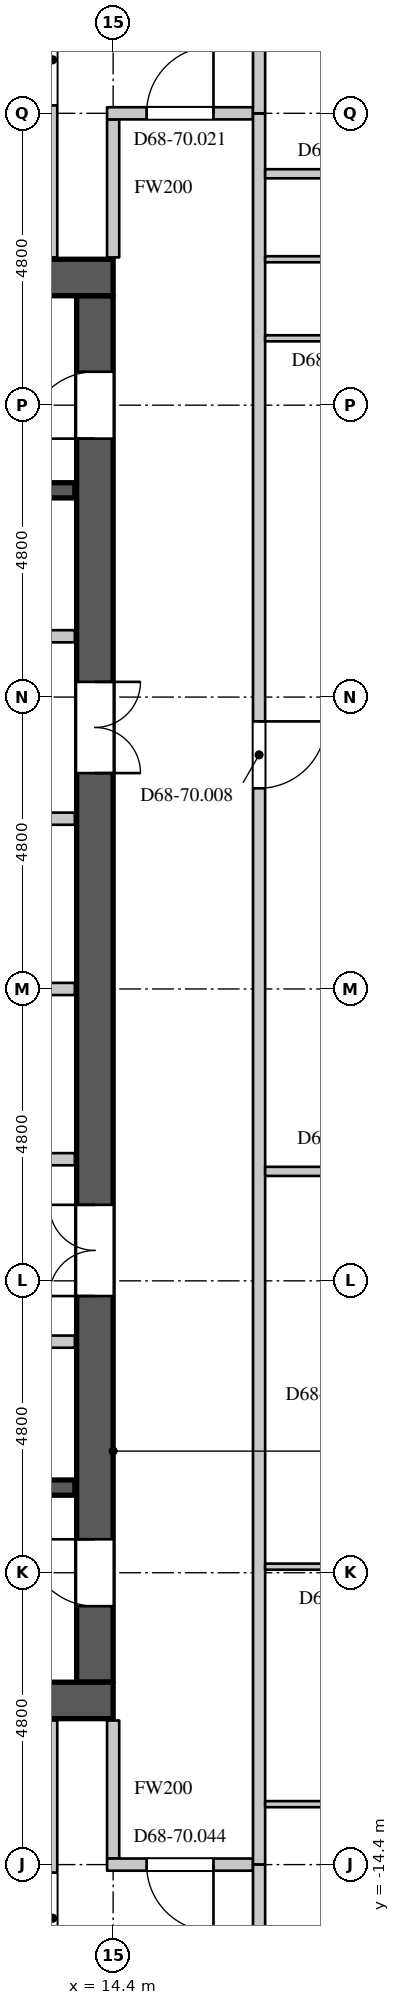
"""IFC4 building model, lengths in metres.
Left out: names, types, materials, properties, quantities, classifications, styles, units other than length and angle.
Written with IfcOpenShell. Run it as: python <this file> out.ifc"""

import sys

from ifc_helpers import new_model, si_unit, direction, frame, frame_2d, origin, place, context, subcontext, project, spatial, rectangle, extrude, element, fill, save


model = new_model("IFC4")
c1 = context("Model", 3, precision=1e-05, world=origin(), true_north=direction((0.0, 1.0)))
c2 = subcontext(c1, "Body", "Model", "MODEL_VIEW")
j1 = project(units=[si_unit("LENGTHUNIT", "METRE"), si_unit("PLANEANGLEUNIT", "RADIAN")], contexts=[c1])
p1 = place(None, origin())
s1 = spatial("IfcSite", under=j1, at=p1, CompositionType="ELEMENT")
p2 = place(p1, origin())
s2 = spatial("IfcBuilding", under=s1, at=p2, CompositionType="ELEMENT")
p3 = place(p2, frame((0.0, 0.0, 293.7)))
s3 = spatial("IfcBuildingStorey", under=s2, at=p3, CompositionType="ELEMENT", Elevation=293.7)
for number, where, z_axis, x_axis in (
    (1, (-14.4, 11.7, 0.0), (0.0, 0.0, 1.0), (1.0, 0.0, 0.0)),
    (2, (-14.4, -11.7, 0.0), (0.0, 0.0, 1.0), (1.0, 0.0, 0.0)),
):
    element("IfcWall", number, at=place(p3, frame(where, z_axis=z_axis, x_axis=x_axis)), inside=s3, PredefinedType="SHEAR", context=c2, shape_type="SweptSolid", body=[
        extrude(rectangle(XDim=28.8, YDim=0.6, at=frame_2d((14.4, 0.0))), origin(), (0.0, 0.0, 1.0), 4.2),
    ])
p4 = place(p3, frame((14.1, -11.4, 0.0), z_axis=(0.0, 0.0, 1.0), x_axis=(0.0, 1.0, 0.0)))
e3 = element("IfcWall", 3, at=p4, inside=s3, PredefinedType="SHEAR", context=c2, shape_type="SweptSolid", body=[
    extrude(rectangle(XDim=22.8, YDim=0.6, at=frame_2d((11.4, 0.0))), origin(), (0.0, 0.0, 1.0), 4.2),
])
p5 = place(p4, frame((20.45, 0.0, 0.0)))
e4 = element("IfcOpeningElement", 4, at=p5, cuts=e3, PredefinedType="OPENING", context=c2, shape_type="SweptSolid", body=[
    extrude(rectangle(XDim=1.1, YDim=2.2, at=frame_2d((0.55, 1.1))), frame((0.0, 0.31, 0.0), z_axis=(0.0, -1.0, 0.0), x_axis=(1.0, 0.0, 0.0)), (0.0, 0.0, 1.0), 0.62),
])
p6 = place(p4, frame((1.25, 0.0, 0.0)))
e5 = element("IfcOpeningElement", 5, at=p6, cuts=e3, PredefinedType="OPENING", context=c2, shape_type="SweptSolid", body=[
    extrude(rectangle(XDim=1.1, YDim=2.2, at=frame_2d((0.55, 1.1))), frame((0.0, 0.31, 0.0), z_axis=(0.0, -1.0, 0.0), x_axis=(1.0, 0.0, 0.0)), (0.0, 0.0, 1.0), 0.62),
])
p7 = place(p4, frame((14.95, 0.0, 0.0)))
e6 = element("IfcOpeningElement", 6, at=p7, cuts=e3, PredefinedType="OPENING", context=c2, shape_type="SweptSolid", body=[
    extrude(rectangle(XDim=1.5, YDim=2.4, at=frame_2d((0.75, 1.2))), frame((0.0, 0.31, 0.0), z_axis=(0.0, -1.0, 0.0), x_axis=(1.0, 0.0, 0.0)), (0.0, 0.0, 1.0), 0.62),
])
p8 = place(p4, frame((6.35, 0.0, 0.0)))
e7 = element("IfcOpeningElement", 7, at=p8, cuts=e3, PredefinedType="OPENING", context=c2, shape_type="SweptSolid", body=[
    extrude(rectangle(XDim=1.5, YDim=2.4, at=frame_2d((0.75, 1.2))), frame((0.0, 0.31, 0.0), z_axis=(0.0, -1.0, 0.0), x_axis=(1.0, 0.0, 0.0)), (0.0, 0.0, 1.0), 0.62),
])
p9 = place(p3, frame((-2.22, -5.8, 0.0), z_axis=(0.0, 0.0, 1.0), x_axis=(1.0, 0.0, 0.0)))
e8 = element("IfcWall", 8, at=p9, inside=s3, PredefinedType="PARTITIONING", context=c2, shape_type="SweptSolid", body=[
    extrude(rectangle(XDim=15.99, YDim=0.2, at=frame_2d((7.995, 0.0))), origin(), (0.0, 0.0, 1.0), 3.95),
])
p10 = place(p9, frame((3.15, 0.0, 0.0)))
e9 = element("IfcOpeningElement", 9, at=p10, cuts=e8, PredefinedType="OPENING", context=c2, shape_type="SweptSolid", body=[
    extrude(rectangle(XDim=0.9, YDim=2.2, at=frame_2d((0.45, 1.1))), frame((0.0, 0.11, 0.0), z_axis=(0.0, -1.0, 0.0), x_axis=(1.0, 0.0, 0.0)), (0.0, 0.0, 1.0), 0.22),
])
p11 = place(p9, frame((8.5, 0.0, 0.0)))
e10 = element("IfcOpeningElement", 10, at=p11, cuts=e8, PredefinedType="OPENING", context=c2, shape_type="SweptSolid", body=[
    extrude(rectangle(XDim=0.9, YDim=2.2, at=frame_2d((0.45, 1.1))), frame((0.0, 0.11, 0.0), z_axis=(0.0, -1.0, 0.0), x_axis=(1.0, 0.0, 0.0)), (0.0, 0.0, 1.0), 0.22),
])
p12 = place(p9, frame((12.85, 0.0, 0.0)))
e11 = element("IfcOpeningElement", 11, at=p12, cuts=e8, PredefinedType="OPENING", context=c2, shape_type="SweptSolid", body=[
    extrude(rectangle(XDim=0.9, YDim=2.2, at=frame_2d((0.45, 1.1))), frame((0.0, 0.11, 0.0), z_axis=(0.0, -1.0, 0.0), x_axis=(1.0, 0.0, 0.0)), (0.0, 0.0, 1.0), 0.22),
])
p13 = place(p3, frame((14.4, -14.3, 0.0), z_axis=(0.0, 0.0, 1.0), x_axis=(0.0, 1.0, 0.0)))
e12 = element("IfcWall", 12, at=p13, inside=s3, PredefinedType="PARTITIONING", context=c2, shape_type="SweptSolid", body=[
    extrude(rectangle(XDim=2.27, YDim=0.2, at=frame_2d((1.135, 0.0))), origin(), (0.0, 0.0, 1.0), 3.95),
])
p14 = place(p3, frame((14.3, -14.4, 0.0), z_axis=(0.0, 0.0, 1.0), x_axis=(1.0, 0.0, 0.0)))
e13 = element("IfcWall", 13, at=p14, inside=s3, PredefinedType="PARTITIONING", context=c2, shape_type="SweptSolid", body=[
    extrude(rectangle(XDim=2.4, YDim=0.2, at=frame_2d((1.2, 0.0))), origin(), (0.0, 0.0, 1.0), 3.95),
])
p15 = place(p14, frame((0.65, 0.0, 0.0)))
e14 = element("IfcOpeningElement", 14, at=p15, cuts=e13, PredefinedType="OPENING", context=c2, shape_type="SweptSolid", body=[
    extrude(rectangle(XDim=1.1, YDim=2.4, at=frame_2d((0.55, 1.2))), frame((0.0, 0.11, 0.0), z_axis=(0.0, -1.0, 0.0), x_axis=(1.0, 0.0, 0.0)), (0.0, 0.0, 1.0), 0.22),
])
p16 = place(p3, frame((14.4, 12.03, 0.0), z_axis=(0.0, 0.0, 1.0), x_axis=(0.0, 1.0, 0.0)))
e15 = element("IfcWall", 15, at=p16, inside=s3, PredefinedType="PARTITIONING", context=c2, shape_type="SweptSolid", body=[
    extrude(rectangle(XDim=2.27, YDim=0.2, at=frame_2d((1.135, 0.0))), origin(), (0.0, 0.0, 1.0), 3.95),
])
p17 = place(p3, frame((14.3, 14.4, 0.0), z_axis=(0.0, 0.0, 1.0), x_axis=(1.0, 0.0, 0.0)))
e16 = element("IfcWall", 16, at=p17, inside=s3, PredefinedType="PARTITIONING", context=c2, shape_type="SweptSolid", body=[
    extrude(rectangle(XDim=2.4, YDim=0.2, at=frame_2d((1.2, 0.0))), origin(), (0.0, 0.0, 1.0), 3.95),
])
p18 = place(p17, frame((0.65, 0.0, 0.0)))
e17 = element("IfcOpeningElement", 17, at=p18, cuts=e16, PredefinedType="OPENING", context=c2, shape_type="SweptSolid", body=[
    extrude(rectangle(XDim=1.1, YDim=2.4, at=frame_2d((0.55, 1.2))), frame((0.0, 0.11, 0.0), z_axis=(0.0, -1.0, 0.0), x_axis=(1.0, 0.0, 0.0)), (0.0, 0.0, 1.0), 0.22),
])
p19 = place(p3, frame((16.8, -14.4, 0.0), z_axis=(0.0, 0.0, 1.0), x_axis=(0.0, 1.0, 0.0)))
e18 = element("IfcWall", 18, at=p19, inside=s3, PredefinedType="PARTITIONING", context=c2, shape_type="SweptSolid", body=[
    extrude(rectangle(XDim=28.8, YDim=0.2, at=frame_2d((14.4, 0.0))), origin(), (0.0, 0.0, 1.0), 3.95),
])
p20 = place(p19, frame((17.7, 0.0, 0.0)))
e19 = element("IfcOpeningElement", 19, at=p20, cuts=e18, PredefinedType="OPENING", context=c2, shape_type="SweptSolid", body=[
    extrude(rectangle(XDim=1.1, YDim=2.4, at=frame_2d((0.55, 1.2))), frame((0.0, 0.11, 0.0), z_axis=(0.0, -1.0, 0.0), x_axis=(1.0, 0.0, 0.0)), (0.0, 0.0, 1.0), 0.22),
])
p21 = place(p3, frame((13.406, -25.731, 0.0), z_axis=(0.0, 0.0, 1.0), x_axis=(0.0, 1.0, 0.0)))
e20 = element("IfcWall", 20, at=p21, inside=s3, PredefinedType="PARTITIONING", context=c2, shape_type="SweptSolid", body=[
    extrude(rectangle(XDim=13.701, YDim=0.15, at=frame_2d((6.851, 0.0))), origin(), (0.0, 0.0, 1.0), 3.3),
])
p22 = place(p21, frame((9.7, 0.0, 0.0)))
e21 = element("IfcOpeningElement", 21, at=p22, cuts=e20, PredefinedType="OPENING", context=c2, shape_type="SweptSolid", body=[
    extrude(rectangle(XDim=1.5, YDim=2.2, at=frame_2d((0.75, 1.1))), frame((0.0, 0.085, 0.0), z_axis=(0.0, -1.0, 0.0), x_axis=(1.0, 0.0, 0.0)), (0.0, 0.0, 1.0), 0.17),
])
p23 = place(p3, frame((13.406, 12.03, 0.0), z_axis=(0.0, 0.0, 1.0), x_axis=(0.0, 1.0, 0.0)))
e22 = element("IfcWall", 22, at=p23, inside=s3, PredefinedType="PARTITIONING", context=c2, shape_type="SweptSolid", body=[
    extrude(rectangle(XDim=13.701, YDim=0.15, at=frame_2d((6.851, 0.0))), origin(), (0.0, 0.0, 1.0), 3.3),
])
p24 = place(p23, frame((2.5, 0.0, 0.0)))
e23 = element("IfcOpeningElement", 23, at=p24, cuts=e22, PredefinedType="OPENING", context=c2, shape_type="SweptSolid", body=[
    extrude(rectangle(XDim=1.5, YDim=2.2, at=frame_2d((0.75, 1.1))), frame((0.0, 0.085, 0.0), z_axis=(0.0, -1.0, 0.0), x_axis=(1.0, 0.0, 0.0)), (0.0, 0.0, 1.0), 0.17),
])
p25 = place(p3, frame((16.9, -3.0, 0.0), z_axis=(0.0, 0.0, 1.0), x_axis=(1.0, 0.0, 0.0)))
e24 = element("IfcWall", 24, at=p25, inside=s3, PredefinedType="PARTITIONING", context=c2, shape_type="SweptSolid", body=[
    extrude(rectangle(XDim=3.725, YDim=0.15, at=frame_2d((1.863, 0.0))), origin(), (0.0, 0.0, 1.0), 3.95),
])
p26 = place(p25, frame((1.35, 0.0, 0.0)))
e25 = element("IfcOpeningElement", 25, at=p26, cuts=e24, PredefinedType="OPENING", context=c2, shape_type="SweptSolid", body=[
    extrude(rectangle(XDim=0.95, YDim=2.2, at=frame_2d((0.475, 1.1))), frame((0.0, 0.085, 0.0), z_axis=(0.0, -1.0, 0.0), x_axis=(1.0, 0.0, 0.0)), (0.0, 0.0, 1.0), 0.17),
])
p27 = place(p3, frame((16.9, 13.406, 0.0), z_axis=(0.0, 0.0, 1.0), x_axis=(1.0, 0.0, 0.0)))
e26 = element("IfcWall", 26, at=p27, inside=s3, PredefinedType="PARTITIONING", context=c2, shape_type="SweptSolid", body=[
    extrude(rectangle(XDim=8.324, YDim=0.15, at=frame_2d((4.162, 0.0))), origin(), (0.0, 0.0, 1.0), 3.95),
])
p28 = place(p27, frame((5.45, 0.0, 0.0)))
e27 = element("IfcOpeningElement", 27, at=p28, cuts=e26, PredefinedType="OPENING", context=c2, shape_type="SweptSolid", body=[
    extrude(rectangle(XDim=1.5, YDim=2.2, at=frame_2d((0.75, 1.1))), frame((0.0, 0.085, 0.0), z_axis=(0.0, -1.0, 0.0), x_axis=(1.0, 0.0, 0.0)), (0.0, 0.0, 1.0), 0.17),
])
p29 = place(p27, frame((1.5, 0.0, 0.0)))
e28 = element("IfcOpeningElement", 28, at=p29, cuts=e26, PredefinedType="OPENING", context=c2, shape_type="SweptSolid", body=[
    extrude(rectangle(XDim=0.9, YDim=2.2, at=frame_2d((0.45, 1.1))), frame((0.0, 0.085, 0.0), z_axis=(0.0, -1.0, 0.0), x_axis=(1.0, 0.0, 0.0)), (0.0, 0.0, 1.0), 0.17),
])
for number, where, z_axis, x_axis in (
    (29, (16.8, -19.803, 0.0), (0.0, 0.0, 1.0), (0.0, 1.0, 0.0)),
    (30, (16.8, 14.4, 0.0), (0.0, 0.0, 1.0), (0.0, 1.0, 0.0)),
):
    element("IfcWall", number, at=place(p3, frame(where, z_axis=z_axis, x_axis=x_axis)), inside=s3, PredefinedType="PARTITIONING", context=c2, shape_type="SweptSolid", body=[
        extrude(rectangle(XDim=5.403, YDim=0.2, at=frame_2d((2.702, 0.0))), origin(), (0.0, 0.0, 1.0), 3.95),
    ])
p30 = place(p3, frame((7.8, -2.8, 0.0), z_axis=(0.0, 0.0, 1.0), x_axis=(1.0, 0.0, 0.0)))
e31 = element("IfcWall", 31, at=p30, inside=s3, PredefinedType="PARTITIONING", context=c2, shape_type="SweptSolid", body=[
    extrude(rectangle(XDim=5.97, YDim=0.2, at=frame_2d((2.985, 0.0))), origin(), (0.0, 0.0, 1.0), 3.95),
])
p31 = place(p30, frame((2.55, 0.0, 0.0)))
e32 = element("IfcOpeningElement", 32, at=p31, cuts=e31, PredefinedType="OPENING", context=c2, shape_type="SweptSolid", body=[
    extrude(rectangle(XDim=0.9, YDim=2.2, at=frame_2d((0.45, 1.1))), frame((0.0, 0.11, 0.0), z_axis=(0.0, -1.0, 0.0), x_axis=(1.0, 0.0, 0.0)), (0.0, 0.0, 1.0), 0.22),
])
p32 = place(p3, frame((7.8, 0.0, 0.0), z_axis=(0.0, 0.0, 1.0), x_axis=(1.0, 0.0, 0.0)))
e33 = element("IfcWall", 33, at=p32, inside=s3, PredefinedType="PARTITIONING", context=c2, shape_type="SweptSolid", body=[
    extrude(rectangle(XDim=5.97, YDim=0.2, at=frame_2d((2.985, 0.0))), origin(), (0.0, 0.0, 1.0), 3.95),
])
p33 = place(p3, frame((9.02, 5.8, 0.0), z_axis=(0.0, 0.0, 1.0), x_axis=(1.0, 0.0, 0.0)))
e34 = element("IfcWall", 34, at=p33, inside=s3, PredefinedType="PARTITIONING", context=c2, shape_type="SweptSolid", body=[
    extrude(rectangle(XDim=4.75, YDim=0.2, at=frame_2d((2.375, 0.0))), origin(), (0.0, 0.0, 1.0), 3.95),
])
p34 = place(p33, frame((1.95, 0.0, 0.0)))
e35 = element("IfcOpeningElement", 35, at=p34, cuts=e34, PredefinedType="OPENING", context=c2, shape_type="SweptSolid", body=[
    extrude(rectangle(XDim=0.9, YDim=2.2, at=frame_2d((0.45, 1.1))), frame((0.0, 0.11, 0.0), z_axis=(0.0, -1.0, 0.0), x_axis=(1.0, 0.0, 0.0)), (0.0, 0.0, 1.0), 0.22),
])
p35 = place(p3, frame((10.42, 2.8, 0.0), z_axis=(0.0, 0.0, 1.0), x_axis=(1.0, 0.0, 0.0)))
e36 = element("IfcWall", 36, at=p35, inside=s3, PredefinedType="PARTITIONING", context=c2, shape_type="SweptSolid", body=[
    extrude(rectangle(XDim=3.35, YDim=0.2, at=frame_2d((1.675, 0.0))), origin(), (0.0, 0.0, 1.0), 3.95),
])
p36 = place(p35, frame((1.35, 0.0, 0.0)))
e37 = element("IfcOpeningElement", 37, at=p36, cuts=e36, PredefinedType="OPENING", context=c2, shape_type="SweptSolid", body=[
    extrude(rectangle(XDim=0.6, YDim=2.0, at=frame_2d((0.3, 1.0))), frame((0.0, 0.11, 0.0), z_axis=(0.0, -1.0, 0.0), x_axis=(1.0, 0.0, 0.0)), (0.0, 0.0, 1.0), 0.22),
])
p37 = place(p3, frame((5.275, -8.2, 0.0), z_axis=(0.0, 0.0, 1.0), x_axis=(1.0, 0.0, 0.0)))
e38 = element("IfcWall", 38, at=p37, inside=s3, PredefinedType="SHEAR", context=c2, shape_type="SweptSolid", body=[
    extrude(rectangle(XDim=8.495, YDim=0.25, at=frame_2d((4.248, 0.0))), origin(), (0.0, 0.0, 1.0), 3.95),
])
p38 = place(p3, frame((5.525, 8.2, 0.0), z_axis=(0.0, 0.0, 1.0), x_axis=(1.0, 0.0, 0.0)))
e39 = element("IfcWall", 39, at=p38, inside=s3, PredefinedType="SHEAR", context=c2, shape_type="SweptSolid", body=[
    extrude(rectangle(XDim=8.245, YDim=0.25, at=frame_2d((4.123, 0.0))), origin(), (0.0, 0.0, 1.0), 3.95),
])
p39 = place(p3, frame((16.9, -13.406, 0.0), z_axis=(0.0, 0.0, 1.0), x_axis=(1.0, 0.0, 0.0)))
e40 = element("IfcWall", 40, at=p39, inside=s3, PredefinedType="PARTITIONING", context=c2, shape_type="SweptSolid", body=[
    extrude(rectangle(XDim=3.78, YDim=0.1, at=frame_2d((1.89, 0.0))), origin(), (0.0, 0.0, 1.0), 3.95),
])
p40 = place(p3, frame((16.9, -9.5, 0.0), z_axis=(0.0, 0.0, 1.0), x_axis=(1.0, 0.0, 0.0)))
e41 = element("IfcWall", 41, at=p40, inside=s3, PredefinedType="PARTITIONING", context=c2, shape_type="SweptSolid", body=[
    extrude(rectangle(XDim=3.725, YDim=0.1, at=frame_2d((1.863, 0.0))), origin(), (0.0, 0.0, 1.0), 3.95),
])
p41 = place(p40, frame((1.4, 0.0, 0.0)))
e42 = element("IfcOpeningElement", 42, at=p41, cuts=e41, PredefinedType="OPENING", context=c2, shape_type="SweptSolid", body=[
    extrude(rectangle(XDim=0.9, YDim=2.2, at=frame_2d((0.45, 1.1))), frame((0.0, 0.06, 0.0), z_axis=(0.0, -1.0, 0.0), x_axis=(1.0, 0.0, 0.0)), (0.0, 0.0, 1.0), 0.12),
])
p42 = place(p3, frame((16.9, 10.7, 0.0), z_axis=(0.0, 0.0, 1.0), x_axis=(1.0, 0.0, 0.0)))
e43 = element("IfcWall", 43, at=p42, inside=s3, PredefinedType="PARTITIONING", context=c2, shape_type="SweptSolid", body=[
    extrude(rectangle(XDim=3.725, YDim=0.1, at=frame_2d((1.863, 0.0))), origin(), (0.0, 0.0, 1.0), 3.95),
])
p43 = place(p42, frame((1.4, 0.0, 0.0)))
e44 = element("IfcOpeningElement", 44, at=p43, cuts=e43, PredefinedType="OPENING", context=c2, shape_type="SweptSolid", body=[
    extrude(rectangle(XDim=0.9, YDim=2.2, at=frame_2d((0.45, 1.1))), frame((0.0, 0.06, 0.0), z_axis=(0.0, -1.0, 0.0), x_axis=(1.0, 0.0, 0.0)), (0.0, 0.0, 1.0), 0.12),
])
p44 = place(p3, frame((16.9, 12.0, 0.0), z_axis=(0.0, 0.0, 1.0), x_axis=(1.0, 0.0, 0.0)))
e45 = element("IfcWall", 45, at=p44, inside=s3, PredefinedType="PARTITIONING", context=c2, shape_type="SweptSolid", body=[
    extrude(rectangle(XDim=2.574, YDim=0.1, at=frame_2d((1.287, 0.0))), origin(), (0.0, 0.0, 1.0), 3.95),
])
p45 = place(p5, origin())
e46 = element("IfcDoor", 46, at=p45, inside=s3, OperationType="SINGLE_SWING_LEFT", PredefinedType="DOOR", context=c2, shape_type="SweptSolid", body=[
    extrude(rectangle(XDim=1.1, YDim=2.2, at=frame_2d((0.55, 1.1))), frame((0.0, 0.295, 0.0), z_axis=(0.0, -1.0, 0.0), x_axis=(1.0, 0.0, 0.0)), (0.0, 0.0, 1.0), 0.05),
])
fill(e4, e46)
p46 = place(p6, origin())
e47 = element("IfcDoor", 47, at=p46, inside=s3, OperationType="SINGLE_SWING_RIGHT", PredefinedType="DOOR", context=c2, shape_type="SweptSolid", body=[
    extrude(rectangle(XDim=1.1, YDim=2.2, at=frame_2d((0.55, 1.1))), frame((0.0, 0.295, 0.0), z_axis=(0.0, -1.0, 0.0), x_axis=(1.0, 0.0, 0.0)), (0.0, 0.0, 1.0), 0.05),
])
fill(e5, e47)
p47 = place(p7, origin())
e48 = element("IfcDoor", 48, at=p47, inside=s3, OperationType="DOUBLE_DOOR_SINGLE_SWING", PredefinedType="DOOR", context=c2, shape_type="SweptSolid", body=[
    extrude(rectangle(XDim=1.5, YDim=2.4, at=frame_2d((0.75, 1.2))), frame((0.0, -0.245, 0.0), z_axis=(0.0, -1.0, 0.0), x_axis=(1.0, 0.0, 0.0)), (0.0, 0.0, 1.0), 0.05),
])
fill(e6, e48)
p48 = place(p8, origin())
e49 = element("IfcDoor", 49, at=p48, inside=s3, OperationType="DOUBLE_DOOR_SINGLE_SWING", PredefinedType="DOOR", context=c2, shape_type="SweptSolid", body=[
    extrude(rectangle(XDim=1.5, YDim=2.4, at=frame_2d((0.75, 1.2))), frame((0.0, 0.295, 0.0), z_axis=(0.0, -1.0, 0.0), x_axis=(1.0, 0.0, 0.0)), (0.0, 0.0, 1.0), 0.05),
])
fill(e7, e49)
p49 = place(p20, origin())
e50 = element("IfcDoor", 50, at=p49, inside=s3, OperationType="SINGLE_SWING_LEFT", PredefinedType="DOOR", context=c2, shape_type="SweptSolid", body=[
    extrude(rectangle(XDim=1.1, YDim=2.4, at=frame_2d((0.55, 1.2))), frame((0.0, 0.025, 0.0), z_axis=(0.0, -1.0, 0.0), x_axis=(1.0, 0.0, 0.0)), (0.0, 0.0, 1.0), 0.05),
])
fill(e19, e50)
p50 = place(p18, origin())
e51 = element("IfcDoor", 51, at=p50, inside=s3, OperationType="SINGLE_SWING_RIGHT", PredefinedType="DOOR", context=c2, shape_type="SweptSolid", body=[
    extrude(rectangle(XDim=1.1, YDim=2.4, at=frame_2d((0.55, 1.2))), frame((0.0, 0.025, 0.0), z_axis=(0.0, -1.0, 0.0), x_axis=(1.0, 0.0, 0.0)), (0.0, 0.0, 1.0), 0.05),
])
fill(e17, e51)
p51 = place(p24, origin())
e52 = element("IfcDoor", 52, at=p51, inside=s3, OperationType="DOUBLE_DOOR_SINGLE_SWING", PredefinedType="DOOR", context=c2, shape_type="SweptSolid", body=[
    extrude(rectangle(XDim=1.5, YDim=2.2, at=frame_2d((0.75, 1.1))), frame((0.0, 0.025, 0.0), z_axis=(0.0, -1.0, 0.0), x_axis=(1.0, 0.0, 0.0)), (0.0, 0.0, 1.0), 0.05),
])
fill(e23, e52)
p52 = place(p15, origin())
e53 = element("IfcDoor", 53, at=p52, inside=s3, OperationType="SINGLE_SWING_LEFT", PredefinedType="DOOR", context=c2, shape_type="SweptSolid", body=[
    extrude(rectangle(XDim=1.1, YDim=2.4, at=frame_2d((0.55, 1.2))), frame((0.0, 0.025, 0.0), z_axis=(0.0, -1.0, 0.0), x_axis=(1.0, 0.0, 0.0)), (0.0, 0.0, 1.0), 0.05),
])
fill(e14, e53)
p53 = place(p22, origin())
e54 = element("IfcDoor", 54, at=p53, inside=s3, OperationType="DOUBLE_DOOR_SINGLE_SWING", PredefinedType="DOOR", context=c2, shape_type="SweptSolid", body=[
    extrude(rectangle(XDim=1.5, YDim=2.2, at=frame_2d((0.75, 1.1))), frame((0.0, 0.025, 0.0), z_axis=(0.0, -1.0, 0.0), x_axis=(1.0, 0.0, 0.0)), (0.0, 0.0, 1.0), 0.05),
])
fill(e21, e54)
save(model, sys.argv[1])
